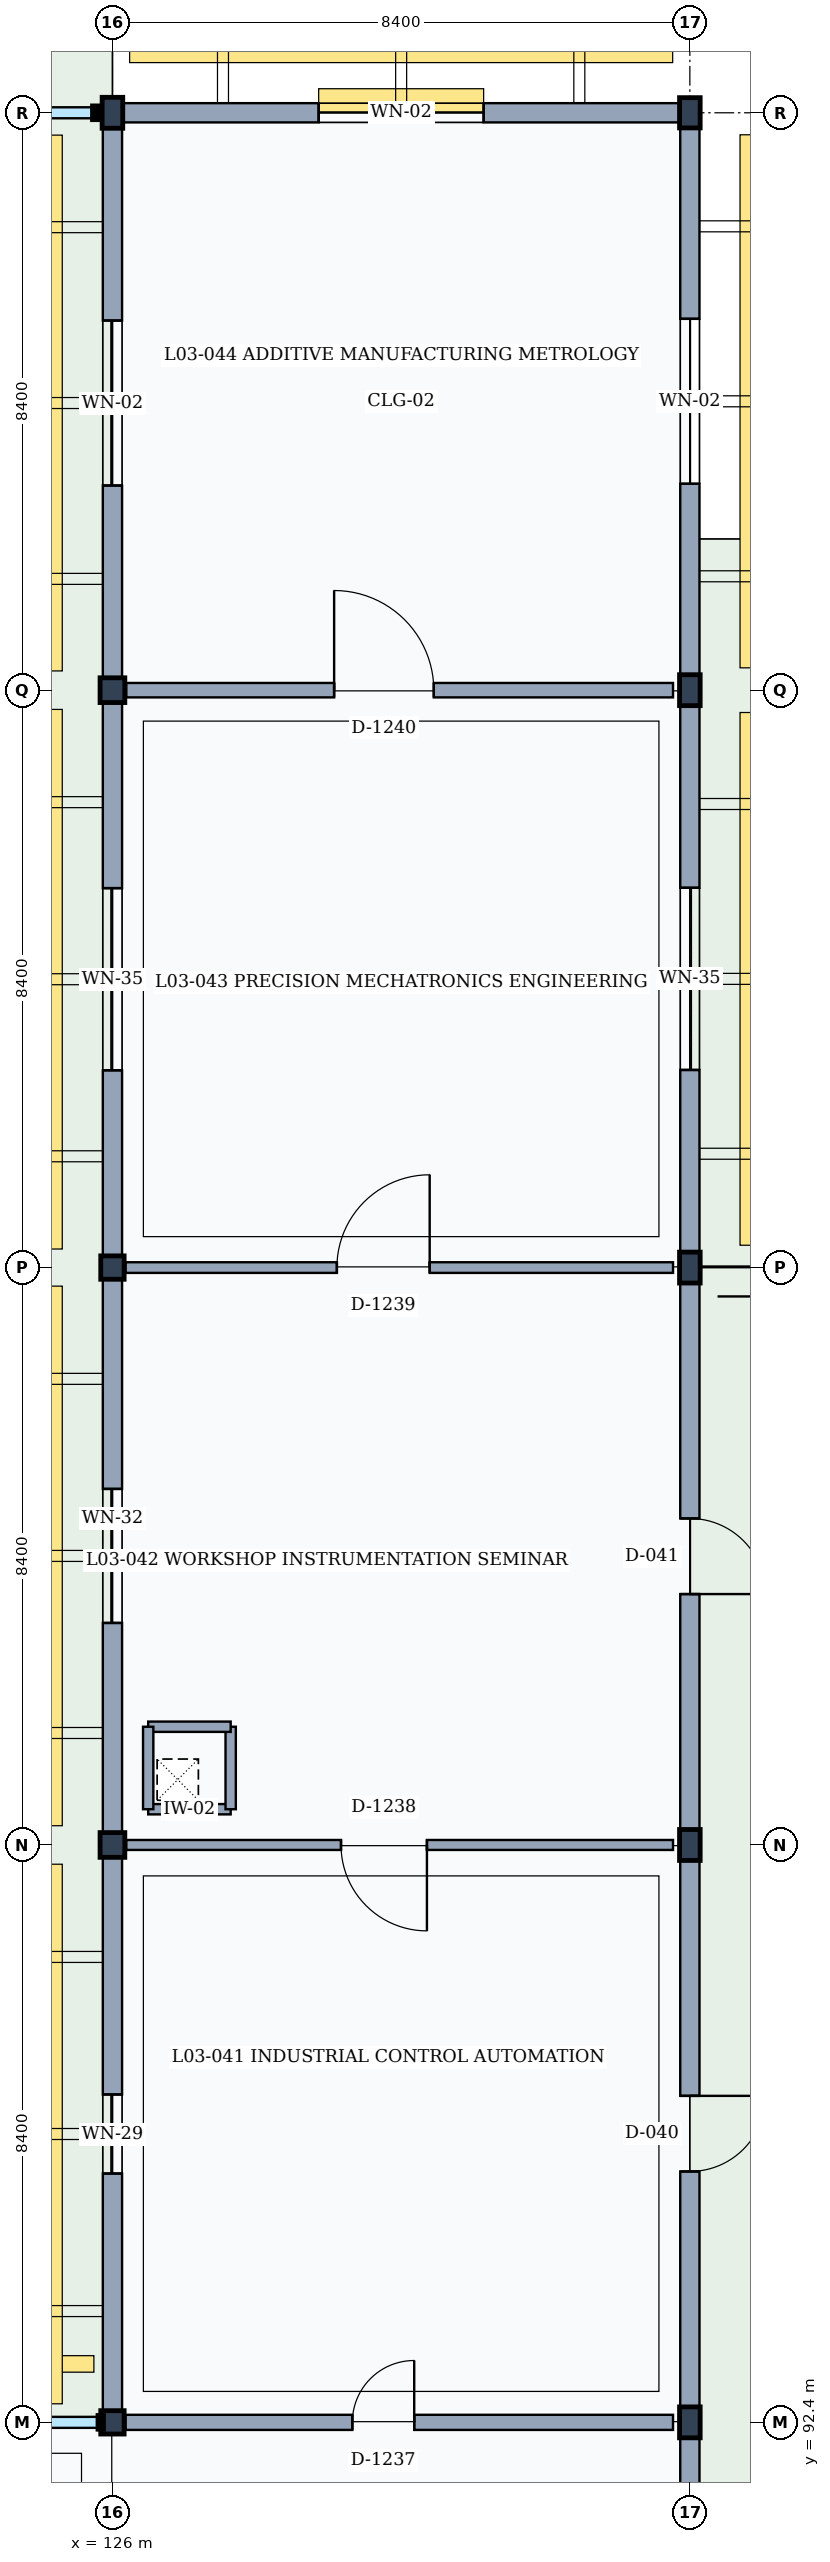
"""IFC4 building model, lengths in metres.
Left out: names, types, materials, properties, quantities, classifications, styles, units other than length and angle.
Written with IfcOpenShell. Run it as: python <this file> out.ifc"""

import sys

from ifc_helpers import new_model, si_unit, direction, frame, frame_2d, origin, origin_2d, place, context, subcontext, project, spatial, rectangle, i_section, extrude, element, fill, save


model = new_model("IFC4")
c1 = context("Model", 3, precision=1e-05, world=origin(), true_north=direction((0.0, 1.0)))
c2 = subcontext(c1, "Body", "Model", "MODEL_VIEW")
j1 = project(units=[si_unit("LENGTHUNIT", "METRE"), si_unit("PLANEANGLEUNIT", "RADIAN")], contexts=[c1])
p1 = place(None, origin())
s1 = spatial("IfcSite", under=j1, at=p1, CompositionType="ELEMENT")
p2 = place(p1, origin())
s2 = spatial("IfcBuilding", under=s1, at=p2, CompositionType="ELEMENT")
p3 = place(p2, frame((0.0, 0.0, 13.8)))
s3 = spatial("IfcBuildingStorey", under=s2, at=p3, CompositionType="ELEMENT", Elevation=13.8)
p4 = place(p3, frame((126.0, 92.4, 0.0), z_axis=(0.0, 0.0, 1.0), x_axis=(1.0, 0.0, 0.0)))
e1 = element("IfcColumn", 1, at=p4, inside=s3, PredefinedType="COLUMN", context=c2, shape_type="SweptSolid", body=[
    extrude(rectangle(XDim=0.34, YDim=0.34, at=origin_2d()), origin(), (0.0, 0.0, 1.0), 4.2),
])
p5 = place(p3, frame((126.0, 100.8, 0.0), z_axis=(0.0, 0.0, 1.0), x_axis=(1.0, 0.0, 0.0)))
e2 = element("IfcColumn", 2, at=p5, inside=s3, PredefinedType="COLUMN", context=c2, shape_type="SweptSolid", body=[
    extrude(rectangle(XDim=0.36, YDim=0.36, at=origin_2d()), origin(), (0.0, 0.0, 1.0), 4.2),
])
p6 = place(p3, frame((126.0, 109.2, 0.0), z_axis=(0.0, 0.0, 1.0), x_axis=(1.0, 0.0, 0.0)))
e3 = element("IfcColumn", 3, at=p6, inside=s3, PredefinedType="COLUMN", context=c2, shape_type="SweptSolid", body=[
    extrude(rectangle(XDim=0.34, YDim=0.34, at=origin_2d()), origin(), (0.0, 0.0, 1.0), 4.2),
])
p7 = place(p3, frame((126.0, 117.6, 0.0), z_axis=(0.0, 0.0, 1.0), x_axis=(1.0, 0.0, 0.0)))
e4 = element("IfcColumn", 4, at=p7, inside=s3, PredefinedType="COLUMN", context=c2, shape_type="SweptSolid", body=[
    extrude(rectangle(XDim=0.36, YDim=0.36, at=origin_2d()), origin(), (0.0, 0.0, 1.0), 4.2),
])
for number, where, z_axis, x_axis in (
    (5, (126.0, 126.0, 0.0), (0.0, 0.0, 1.0), (1.0, 0.0, 0.0)),
    (6, (134.4, 92.4, 0.0), (0.0, 0.0, 1.0), (1.0, 0.0, 0.0)),
    (7, (134.4, 100.8, 0.0), (0.0, 0.0, 1.0), (1.0, 0.0, 0.0)),
    (8, (134.4, 109.2, 0.0), (0.0, 0.0, 1.0), (1.0, 0.0, 0.0)),
    (9, (134.4, 117.6, 0.0), (0.0, 0.0, 1.0), (1.0, 0.0, 0.0)),
):
    element("IfcColumn", number, at=place(p3, frame(where, z_axis=z_axis, x_axis=x_axis)), inside=s3, PredefinedType="COLUMN", context=c2, shape_type="SweptSolid", body=[
        extrude(i_section(OverallWidth=0.3, OverallDepth=0.45, WebThickness=0.014, FlangeThickness=0.026, FilletRadius=0.027, at=origin_2d()), origin(), (0.0, 0.0, 1.0), 4.2),
    ])
p8 = place(p3, frame((134.4, 126.0, 0.0), z_axis=(0.0, 0.0, 1.0), x_axis=(1.0, 0.0, 0.0)))
e10 = element("IfcColumn", 10, at=p8, inside=s3, PredefinedType="COLUMN", context=c2, shape_type="SweptSolid", body=[
    extrude(i_section(OverallWidth=0.3, OverallDepth=0.44, WebThickness=0.011, FlangeThickness=0.021, FilletRadius=0.027, at=origin_2d()), origin(), (0.0, 0.0, 1.0), 4.2),
])
p9 = place(p3, frame((134.4, 92.175, 0.0), z_axis=(0.0, 0.0, 1.0), x_axis=(0.0, -1.0, 0.0)))
e11 = element("IfcWall", 11, at=p9, inside=s3, PredefinedType="SOLIDWALL", context=c2, shape_type="SweptSolid", body=[
    extrude(rectangle(XDim=7.955, YDim=0.28, at=frame_2d((3.978, 0.0))), origin(), (0.0, 0.0, 1.0), 3.36),
])
p10 = place(p9, frame((3.427, 0.0, 0.0)))
e12 = element("IfcOpeningElement", 12, at=p10, cuts=e11, PredefinedType="OPENING", context=c2, shape_type="SweptSolid", body=[
    extrude(rectangle(XDim=1.1, YDim=2.2, at=frame_2d((0.55, 1.1))), frame((0.0, 0.15, 0.0), z_axis=(0.0, -1.0, 0.0), x_axis=(1.0, 0.0, 0.0)), (0.0, 0.0, 1.0), 0.3),
])
p11 = place(p3, frame((126.0, 92.57, 0.0), z_axis=(0.0, 0.0, 1.0), x_axis=(0.0, 1.0, 0.0)))
e13 = element("IfcWall", 13, at=p11, inside=s3, PredefinedType="SOLIDWALL", context=c2, shape_type="SweptSolid", body=[
    extrude(rectangle(XDim=8.05, YDim=0.28, at=frame_2d((4.025, 0.0))), origin(), (0.0, 0.0, 1.0), 3.36),
])
p12 = place(p11, frame((3.45, 0.0, 0.9)))
e14 = element("IfcOpeningElement", 14, at=p12, cuts=e13, PredefinedType="OPENING", context=c2, shape_type="SweptSolid", body=[
    extrude(rectangle(XDim=1.15, YDim=1.65, at=frame_2d((0.575, 0.825))), frame((0.0, 0.15, 0.0), z_axis=(0.0, -1.0, 0.0), x_axis=(1.0, 0.0, 0.0)), (0.0, 0.0, 1.0), 0.3),
])
p13 = place(p3, frame((134.4, 100.575, 0.0), z_axis=(0.0, 0.0, 1.0), x_axis=(0.0, -1.0, 0.0)))
e15 = element("IfcWall", 15, at=p13, inside=s3, PredefinedType="SOLIDWALL", context=c2, shape_type="SweptSolid", body=[
    extrude(rectangle(XDim=7.95, YDim=0.28, at=frame_2d((3.975, 0.0))), origin(), (0.0, 0.0, 1.0), 3.36),
])
p14 = place(p13, frame((3.425, 0.0, 0.0)))
e16 = element("IfcOpeningElement", 16, at=p14, cuts=e15, PredefinedType="OPENING", context=c2, shape_type="SweptSolid", body=[
    extrude(rectangle(XDim=1.1, YDim=2.2, at=frame_2d((0.55, 1.1))), frame((0.0, 0.15, 0.0), z_axis=(0.0, -1.0, 0.0), x_axis=(1.0, 0.0, 0.0)), (0.0, 0.0, 1.0), 0.3),
])
p15 = place(p3, frame((126.0, 100.98, 0.0), z_axis=(0.0, 0.0, 1.0), x_axis=(0.0, 1.0, 0.0)))
e17 = element("IfcWall", 17, at=p15, inside=s3, PredefinedType="SOLIDWALL", context=c2, shape_type="SweptSolid", body=[
    extrude(rectangle(XDim=8.05, YDim=0.28, at=frame_2d((4.025, 0.0))), origin(), (0.0, 0.0, 1.0), 3.36),
])
p16 = place(p15, frame((3.05, 0.0, 0.9)))
e18 = element("IfcOpeningElement", 18, at=p16, cuts=e17, PredefinedType="OPENING", context=c2, shape_type="SweptSolid", body=[
    extrude(rectangle(XDim=1.95, YDim=1.7, at=frame_2d((0.975, 0.85))), frame((0.0, 0.15, 0.0), z_axis=(0.0, -1.0, 0.0), x_axis=(1.0, 0.0, 0.0)), (0.0, 0.0, 1.0), 0.3),
])
p17 = place(p3, frame((134.4, 108.975, 0.0), z_axis=(0.0, 0.0, 1.0), x_axis=(0.0, -1.0, 0.0)))
e19 = element("IfcWall", 19, at=p17, inside=s3, PredefinedType="SOLIDWALL", context=c2, shape_type="SweptSolid", body=[
    extrude(rectangle(XDim=7.95, YDim=0.28, at=frame_2d((3.975, 0.0))), origin(), (0.0, 0.0, 1.0), 3.36),
])
p18 = place(p17, frame((3.425, 0.0, 0.0)))
e20 = element("IfcOpeningElement", 20, at=p18, cuts=e19, PredefinedType="OPENING", context=c2, shape_type="SweptSolid", body=[
    extrude(rectangle(XDim=1.1, YDim=2.2, at=frame_2d((0.55, 1.1))), frame((0.0, 0.15, 0.0), z_axis=(0.0, -1.0, 0.0), x_axis=(1.0, 0.0, 0.0)), (0.0, 0.0, 1.0), 0.3),
])
p19 = place(p3, frame((126.0, 109.37, 0.0), z_axis=(0.0, 0.0, 1.0), x_axis=(0.0, 1.0, 0.0)))
e21 = element("IfcWall", 21, at=p19, inside=s3, PredefinedType="SOLIDWALL", context=c2, shape_type="SweptSolid", body=[
    extrude(rectangle(XDim=8.05, YDim=0.28, at=frame_2d((4.025, 0.0))), origin(), (0.0, 0.0, 1.0), 3.36),
])
p20 = place(p19, frame((2.7, 0.0, 0.9)))
e22 = element("IfcOpeningElement", 22, at=p20, cuts=e21, PredefinedType="OPENING", context=c2, shape_type="SweptSolid", body=[
    extrude(rectangle(XDim=2.65, YDim=1.8, at=frame_2d((1.325, 0.9))), frame((0.0, 0.15, 0.0), z_axis=(0.0, -1.0, 0.0), x_axis=(1.0, 0.0, 0.0)), (0.0, 0.0, 1.0), 0.3),
])
p21 = place(p3, frame((134.4, 117.375, 0.0), z_axis=(0.0, 0.0, 1.0), x_axis=(0.0, -1.0, 0.0)))
e23 = element("IfcWall", 23, at=p21, inside=s3, PredefinedType="SOLIDWALL", context=c2, shape_type="SweptSolid", body=[
    extrude(rectangle(XDim=7.95, YDim=0.28, at=frame_2d((3.975, 0.0))), origin(), (0.0, 0.0, 1.0), 3.36),
])
p22 = place(p21, frame((2.65, 0.0, 0.9)))
e24 = element("IfcOpeningElement", 24, at=p22, cuts=e23, PredefinedType="OPENING", context=c2, shape_type="SweptSolid", body=[
    extrude(rectangle(XDim=2.65, YDim=1.8, at=frame_2d((1.325, 0.9))), frame((0.0, 0.15, 0.0), z_axis=(0.0, -1.0, 0.0), x_axis=(1.0, 0.0, 0.0)), (0.0, 0.0, 1.0), 0.3),
])
p23 = place(p3, frame((126.15, 126.0, 0.0), z_axis=(0.0, 0.0, 1.0), x_axis=(1.0, 0.0, 0.0)))
e25 = element("IfcWall", 25, at=p23, inside=s3, PredefinedType="SOLIDWALL", context=c2, shape_type="SweptSolid", body=[
    extrude(rectangle(XDim=8.1, YDim=0.28, at=frame_2d((4.05, 0.0))), origin(), (0.0, 0.0, 1.0), 3.36),
])
p24 = place(p23, frame((2.85, 0.0, 0.9)))
e26 = element("IfcOpeningElement", 26, at=p24, cuts=e25, PredefinedType="OPENING", context=c2, shape_type="SweptSolid", body=[
    extrude(rectangle(XDim=2.4, YDim=1.8, at=frame_2d((1.2, 0.9))), frame((0.0, 0.15, 0.0), z_axis=(0.0, -1.0, 0.0), x_axis=(1.0, 0.0, 0.0)), (0.0, 0.0, 1.0), 0.3),
])
p25 = place(p3, frame((126.0, 117.78, 0.0), z_axis=(0.0, 0.0, 1.0), x_axis=(0.0, 1.0, 0.0)))
e27 = element("IfcWall", 27, at=p25, inside=s3, PredefinedType="SOLIDWALL", context=c2, shape_type="SweptSolid", body=[
    extrude(rectangle(XDim=7.995, YDim=0.28, at=frame_2d((3.998, 0.0))), origin(), (0.0, 0.0, 1.0), 3.36),
])
p26 = place(p25, frame((2.798, 0.0, 0.9)))
e28 = element("IfcOpeningElement", 28, at=p26, cuts=e27, PredefinedType="OPENING", context=c2, shape_type="SweptSolid", body=[
    extrude(rectangle(XDim=2.4, YDim=1.8, at=frame_2d((1.2, 0.9))), frame((0.0, 0.15, 0.0), z_axis=(0.0, -1.0, 0.0), x_axis=(1.0, 0.0, 0.0)), (0.0, 0.0, 1.0), 0.3),
])
p27 = place(p3, frame((134.4, 125.78, 0.0), z_axis=(0.0, 0.0, 1.0), x_axis=(0.0, -1.0, 0.0)))
e29 = element("IfcWall", 29, at=p27, inside=s3, PredefinedType="SOLIDWALL", context=c2, shape_type="SweptSolid", body=[
    extrude(rectangle(XDim=7.955, YDim=0.28, at=frame_2d((3.978, 0.0))), origin(), (0.0, 0.0, 1.0), 3.36),
])
p28 = place(p27, frame((2.778, 0.0, 0.9)))
e30 = element("IfcOpeningElement", 30, at=p28, cuts=e29, PredefinedType="OPENING", context=c2, shape_type="SweptSolid", body=[
    extrude(rectangle(XDim=2.4, YDim=1.8, at=frame_2d((1.2, 0.9))), frame((0.0, 0.15, 0.0), z_axis=(0.0, -1.0, 0.0), x_axis=(1.0, 0.0, 0.0)), (0.0, 0.0, 1.0), 0.3),
])
for number, where, z_axis, x_axis in (
    (31, (126.52, 101.32, 0.0), (0.0, 0.0, 1.0), (1.0, 0.0, 0.0)),
    (32, (127.72, 101.32, 0.0), (0.0, 0.0, 1.0), (0.0, 1.0, 0.0)),
    (33, (127.72, 102.52, 0.0), (0.0, 0.0, 1.0), (-1.0, 0.0, 0.0)),
    (34, (126.52, 102.52, 0.0), (0.0, 0.0, 1.0), (0.0, -1.0, 0.0)),
):
    element("IfcWall", number, at=place(p3, frame(where, z_axis=z_axis, x_axis=x_axis)), inside=s3, PredefinedType="PARTITIONING", context=c2, shape_type="SweptSolid", body=[
        extrude(rectangle(XDim=1.2, YDim=0.15, at=frame_2d((0.6, 0.0))), origin(), (0.0, 0.0, 1.0), 3.98),
    ])
p29 = place(p3, frame((126.19, 92.4, 0.0), z_axis=(0.0, 0.0, 1.0), x_axis=(1.0, 0.0, 0.0)))
e35 = element("IfcWall", 35, at=p29, inside=s3, PredefinedType="PARTITIONING", context=c2, shape_type="SweptSolid", body=[
    extrude(rectangle(XDim=7.965, YDim=0.22, at=frame_2d((3.982, 0.0))), origin(), (0.0, 0.0, 1.0), 3.32),
])
p30 = place(p29, frame((3.3, 0.0, 0.0)))
e36 = element("IfcOpeningElement", 36, at=p30, cuts=e35, PredefinedType="OPENING", context=c2, shape_type="SweptSolid", body=[
    extrude(rectangle(XDim=0.9, YDim=2.1, at=frame_2d((0.45, 1.05))), frame((0.0, 0.12, 0.0), z_axis=(0.0, -1.0, 0.0), x_axis=(1.0, 0.0, 0.0)), (0.0, 0.0, 1.0), 0.24),
])
p31 = place(p3, frame((126.2, 100.8, 0.0), z_axis=(0.0, 0.0, 1.0), x_axis=(1.0, 0.0, 0.0)))
e37 = element("IfcWall", 37, at=p31, inside=s3, PredefinedType="PARTITIONING", context=c2, shape_type="SweptSolid", body=[
    extrude(rectangle(XDim=7.955, YDim=0.145, at=frame_2d((3.978, 0.0))), origin(), (0.0, 0.0, 1.0), 3.32),
])
p32 = place(p31, frame((3.125, 0.0, 0.0)))
e38 = element("IfcOpeningElement", 38, at=p32, cuts=e37, PredefinedType="OPENING", context=c2, shape_type="SweptSolid", body=[
    extrude(rectangle(XDim=1.25, YDim=2.3, at=frame_2d((0.625, 1.15))), frame((0.0, 0.083, 0.0), z_axis=(0.0, -1.0, 0.0), x_axis=(1.0, 0.0, 0.0)), (0.0, 0.0, 1.0), 0.165),
])
p33 = place(p3, frame((126.19, 109.2, 0.0), z_axis=(0.0, 0.0, 1.0), x_axis=(1.0, 0.0, 0.0)))
e39 = element("IfcWall", 39, at=p33, inside=s3, PredefinedType="PARTITIONING", context=c2, shape_type="SweptSolid", body=[
    extrude(rectangle(XDim=7.965, YDim=0.155, at=frame_2d((3.982, 0.0))), origin(), (0.0, 0.0, 1.0), 3.32),
])
p34 = place(p33, frame((3.075, 0.0, 0.0)))
e40 = element("IfcOpeningElement", 40, at=p34, cuts=e39, PredefinedType="OPENING", context=c2, shape_type="SweptSolid", body=[
    extrude(rectangle(XDim=1.35, YDim=2.25, at=frame_2d((0.675, 1.125))), frame((0.0, 0.087, 0.0), z_axis=(0.0, -1.0, 0.0), x_axis=(1.0, 0.0, 0.0)), (0.0, 0.0, 1.0), 0.175),
])
p35 = place(p3, frame((126.2, 117.6, 0.0), z_axis=(0.0, 0.0, 1.0), x_axis=(1.0, 0.0, 0.0)))
e41 = element("IfcWall", 41, at=p35, inside=s3, PredefinedType="PARTITIONING", context=c2, shape_type="SweptSolid", body=[
    extrude(rectangle(XDim=7.955, YDim=0.21, at=frame_2d((3.978, 0.0))), origin(), (0.0, 0.0, 1.0), 3.32),
])
p36 = place(p35, frame((3.025, 0.0, 0.0)))
e42 = element("IfcOpeningElement", 42, at=p36, cuts=e41, PredefinedType="OPENING", context=c2, shape_type="SweptSolid", body=[
    extrude(rectangle(XDim=1.45, YDim=2.35, at=frame_2d((0.725, 1.175))), frame((0.0, 0.115, 0.0), z_axis=(0.0, -1.0, 0.0), x_axis=(1.0, 0.0, 0.0)), (0.0, 0.0, 1.0), 0.23),
])
p37 = place(p12, origin())
e43 = element("IfcWindow", 43, at=p37, inside=s3, PartitioningType="SINGLE_PANEL", PredefinedType="WINDOW", context=c2, shape_type="SweptSolid", body=[
    extrude(rectangle(XDim=1.15, YDim=1.65, at=frame_2d((0.575, 0.825))), frame((0.0, 0.03, 0.0), z_axis=(0.0, -1.0, 0.0), x_axis=(1.0, 0.0, 0.0)), (0.0, 0.0, 1.0), 0.06),
])
fill(e14, e43)
p38 = place(p14, origin())
e44 = element("IfcDoor", 44, at=p38, inside=s3, OperationType="SINGLE_SWING_LEFT", PredefinedType="DOOR", context=c2, shape_type="SweptSolid", body=[
    extrude(rectangle(XDim=1.1, YDim=2.2, at=frame_2d((0.55, 1.1))), frame((0.0, 0.025, 0.0), z_axis=(0.0, -1.0, 0.0), x_axis=(1.0, 0.0, 0.0)), (0.0, 0.0, 1.0), 0.05),
])
fill(e16, e44)
p39 = place(p16, origin())
e45 = element("IfcWindow", 45, at=p39, inside=s3, PartitioningType="SINGLE_PANEL", PredefinedType="WINDOW", context=c2, shape_type="SweptSolid", body=[
    extrude(rectangle(XDim=1.95, YDim=1.7, at=frame_2d((0.975, 0.85))), frame((0.0, 0.03, 0.0), z_axis=(0.0, -1.0, 0.0), x_axis=(1.0, 0.0, 0.0)), (0.0, 0.0, 1.0), 0.06),
])
fill(e18, e45)
p40 = place(p18, origin())
e46 = element("IfcDoor", 46, at=p40, inside=s3, OperationType="SINGLE_SWING_RIGHT", PredefinedType="DOOR", context=c2, shape_type="SweptSolid", body=[
    extrude(rectangle(XDim=1.1, YDim=2.2, at=frame_2d((0.55, 1.1))), frame((0.0, 0.025, 0.0), z_axis=(0.0, -1.0, 0.0), x_axis=(1.0, 0.0, 0.0)), (0.0, 0.0, 1.0), 0.05),
])
fill(e20, e46)
p41 = place(p20, origin())
e47 = element("IfcWindow", 47, at=p41, inside=s3, PartitioningType="SINGLE_PANEL", PredefinedType="WINDOW", context=c2, shape_type="SweptSolid", body=[
    extrude(rectangle(XDim=2.65, YDim=1.8, at=frame_2d((1.325, 0.9))), frame((0.0, 0.03, 0.0), z_axis=(0.0, -1.0, 0.0), x_axis=(1.0, 0.0, 0.0)), (0.0, 0.0, 1.0), 0.06),
])
fill(e22, e47)
p42 = place(p22, origin())
e48 = element("IfcWindow", 48, at=p42, inside=s3, PartitioningType="SINGLE_PANEL", PredefinedType="WINDOW", context=c2, shape_type="SweptSolid", body=[
    extrude(rectangle(XDim=2.65, YDim=1.8, at=frame_2d((1.325, 0.9))), frame((0.0, 0.03, 0.0), z_axis=(0.0, -1.0, 0.0), x_axis=(1.0, 0.0, 0.0)), (0.0, 0.0, 1.0), 0.06),
])
fill(e24, e48)
p43 = place(p24, origin())
e49 = element("IfcWindow", 49, at=p43, inside=s3, PartitioningType="SINGLE_PANEL", PredefinedType="WINDOW", context=c2, shape_type="SweptSolid", body=[
    extrude(rectangle(XDim=2.4, YDim=1.8, at=frame_2d((1.2, 0.9))), frame((0.0, 0.03, 0.0), z_axis=(0.0, -1.0, 0.0), x_axis=(1.0, 0.0, 0.0)), (0.0, 0.0, 1.0), 0.06),
])
fill(e26, e49)
p44 = place(p26, origin())
e50 = element("IfcWindow", 50, at=p44, inside=s3, PartitioningType="SINGLE_PANEL", PredefinedType="WINDOW", context=c2, shape_type="SweptSolid", body=[
    extrude(rectangle(XDim=2.4, YDim=1.8, at=frame_2d((1.2, 0.9))), frame((0.0, 0.03, 0.0), z_axis=(0.0, -1.0, 0.0), x_axis=(1.0, 0.0, 0.0)), (0.0, 0.0, 1.0), 0.06),
])
fill(e28, e50)
p45 = place(p28, origin())
e51 = element("IfcWindow", 51, at=p45, inside=s3, PartitioningType="SINGLE_PANEL", PredefinedType="WINDOW", context=c2, shape_type="SweptSolid", body=[
    extrude(rectangle(XDim=2.4, YDim=1.8, at=frame_2d((1.2, 0.9))), frame((0.0, 0.03, 0.0), z_axis=(0.0, -1.0, 0.0), x_axis=(1.0, 0.0, 0.0)), (0.0, 0.0, 1.0), 0.06),
])
fill(e30, e51)
p46 = place(p30, origin())
e52 = element("IfcDoor", 52, at=p46, inside=s3, OperationType="SINGLE_SWING_RIGHT", PredefinedType="DOOR", context=c2, shape_type="SweptSolid", body=[
    extrude(rectangle(XDim=0.9, YDim=2.1, at=frame_2d((0.45, 1.05))), frame((0.0, 0.025, 0.0), z_axis=(0.0, -1.0, 0.0), x_axis=(1.0, 0.0, 0.0)), (0.0, 0.0, 1.0), 0.05),
])
fill(e36, e52)
p47 = place(p32, frame((1.25, 0.0, 0.0), z_axis=(0.0, 0.0, 1.0), x_axis=(-1.0, 0.0, 0.0)))
e53 = element("IfcDoor", 53, at=p47, inside=s3, OperationType="SINGLE_SWING_LEFT", PredefinedType="DOOR", context=c2, shape_type="SweptSolid", body=[
    extrude(rectangle(XDim=1.25, YDim=2.3, at=frame_2d((0.625, 1.15))), frame((0.0, 0.025, 0.0), z_axis=(0.0, -1.0, 0.0), x_axis=(1.0, 0.0, 0.0)), (0.0, 0.0, 1.0), 0.05),
])
fill(e38, e53)
p48 = place(p34, origin())
e54 = element("IfcDoor", 54, at=p48, inside=s3, OperationType="SINGLE_SWING_RIGHT", PredefinedType="DOOR", context=c2, shape_type="SweptSolid", body=[
    extrude(rectangle(XDim=1.35, YDim=2.25, at=frame_2d((0.675, 1.125))), frame((0.0, 0.025, 0.0), z_axis=(0.0, -1.0, 0.0), x_axis=(1.0, 0.0, 0.0)), (0.0, 0.0, 1.0), 0.05),
])
fill(e40, e54)
p49 = place(p36, origin())
e55 = element("IfcDoor", 55, at=p49, inside=s3, OperationType="SINGLE_SWING_LEFT", PredefinedType="DOOR", context=c2, shape_type="SweptSolid", body=[
    extrude(rectangle(XDim=1.45, YDim=2.35, at=frame_2d((0.725, 1.175))), frame((0.0, 0.025, 0.0), z_axis=(0.0, -1.0, 0.0), x_axis=(1.0, 0.0, 0.0)), (0.0, 0.0, 1.0), 0.05),
])
fill(e42, e55)
save(model, sys.argv[1])
